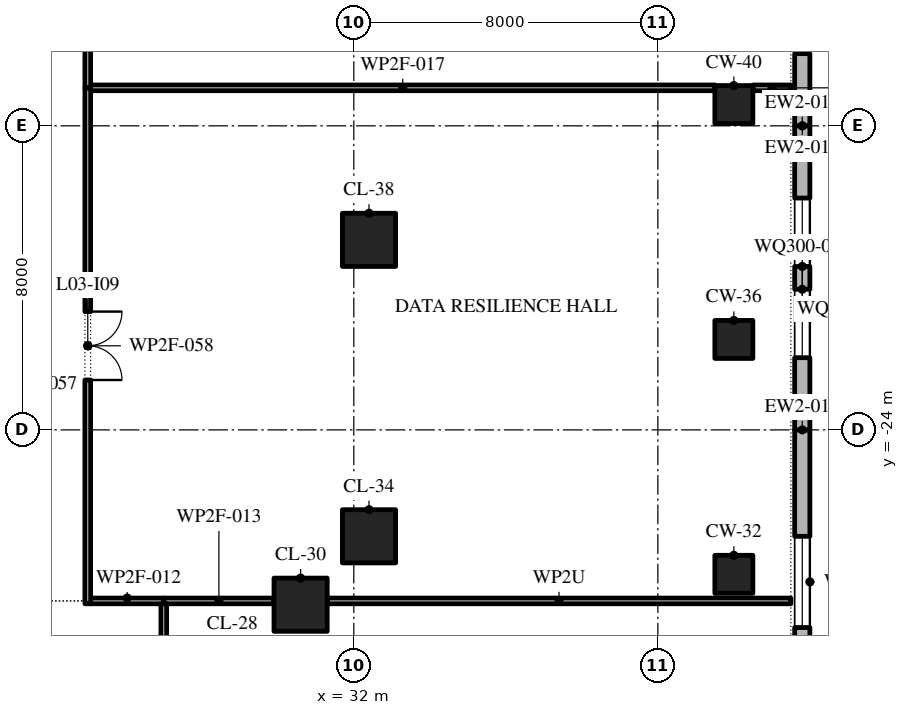
"""IFC4 building model, lengths in metres.
Left out: names, types, materials, properties, quantities, classifications, styles, units other than length and angle.
Written with IfcOpenShell. Run it as: python <this file> out.ifc"""

import sys

from ifc_helpers import new_model, si_unit, direction, frame, frame_2d, origin, origin_2d, place, context, subcontext, project, spatial, polyline, rectangle, outline, extrude, element, fill, save


model = new_model("IFC4")
c1 = context("Model", 3, precision=1e-05, world=origin(), true_north=direction((0.0, 1.0)))
c2 = subcontext(c1, "Body", "Model", "MODEL_VIEW")
j1 = project(units=[si_unit("LENGTHUNIT", "METRE"), si_unit("PLANEANGLEUNIT", "RADIAN")], contexts=[c1])
p1 = place(None, origin())
s1 = spatial("IfcSite", under=j1, at=p1, CompositionType="ELEMENT")
p2 = place(p1, origin())
s2 = spatial("IfcBuilding", under=s1, at=p2, CompositionType="ELEMENT")
p3 = place(p2, frame((0.0, 0.0, 19.2)))
s3 = spatial("IfcBuildingStorey", under=s2, at=p3, CompositionType="ELEMENT", Elevation=19.2)
p4 = place(p3, frame((30.6, -28.6, 0.0), z_axis=(0.0, 0.0, 1.0), x_axis=(1.0, 0.0, 0.0)))
e1 = element("IfcColumn", 1, at=p4, inside=s3, PredefinedType="COLUMN", context=c2, shape_type="SweptSolid", body=[
    extrude(rectangle(XDim=1.4, YDim=1.4, at=origin_2d()), origin(), (0.0, 0.0, 1.0), 4.8),
])
p5 = place(p3, frame((42.0, -27.8, 0.0), z_axis=(0.0, 0.0, 1.0), x_axis=(1.0, 0.0, 0.0)))
e2 = element("IfcColumn", 2, at=p5, inside=s3, PredefinedType="COLUMN", context=c2, shape_type="SweptSolid", body=[
    extrude(rectangle(XDim=1.0, YDim=1.0, at=origin_2d()), origin(), (0.0, 0.0, 1.0), 4.8),
])
p6 = place(p3, frame((32.4, -26.8, 0.0), z_axis=(0.0, 0.0, 1.0), x_axis=(1.0, 0.0, 0.0)))
e3 = element("IfcColumn", 3, at=p6, inside=s3, PredefinedType="COLUMN", context=c2, shape_type="SweptSolid", body=[
    extrude(rectangle(XDim=1.4, YDim=1.4, at=origin_2d()), origin(), (0.0, 0.0, 1.0), 4.8),
])
p7 = place(p3, frame((42.0, -21.62, 0.0), z_axis=(0.0, 0.0, 1.0), x_axis=(1.0, 0.0, 0.0)))
e4 = element("IfcColumn", 4, at=p7, inside=s3, PredefinedType="COLUMN", context=c2, shape_type="SweptSolid", body=[
    extrude(rectangle(XDim=1.0, YDim=1.0, at=origin_2d()), origin(), (0.0, 0.0, 1.0), 4.8),
])
p8 = place(p3, frame((32.4, -19.0, 0.0), z_axis=(0.0, 0.0, 1.0), x_axis=(1.0, 0.0, 0.0)))
e5 = element("IfcColumn", 5, at=p8, inside=s3, PredefinedType="COLUMN", context=c2, shape_type="SweptSolid", body=[
    extrude(rectangle(XDim=1.4, YDim=1.4, at=origin_2d()), origin(), (0.0, 0.0, 1.0), 4.8),
])
p9 = place(p3, frame((42.0, -15.44, 0.0), z_axis=(0.0, 0.0, 1.0), x_axis=(1.0, 0.0, 0.0)))
e6 = element("IfcColumn", 6, at=p9, inside=s3, PredefinedType="COLUMN", context=c2, shape_type="SweptSolid", body=[
    extrude(rectangle(XDim=1.0, YDim=1.0, at=origin_2d()), origin(), (0.0, 0.0, 1.0), 4.8),
])
p10 = place(p3, frame((43.8, -32.0, 0.0), z_axis=(0.0, 0.0, 1.0), x_axis=(0.0, 1.0, 0.0)))
e7 = element("IfcWall", 7, at=p10, inside=s3, PredefinedType="STANDARD", context=c2, shape_type="SweptSolid", body=[
    extrude(rectangle(XDim=8.0, YDim=0.4, at=frame_2d((4.0, 0.0))), origin(), (0.0, 0.0, 1.0), 4.5),
])
p11 = place(p10, frame((2.8, 0.0, 0.9)))
e8 = element("IfcOpeningElement", 8, at=p11, cuts=e7, PredefinedType="OPENING", context=c2, shape_type="SweptSolid", body=[
    extrude(outline(polyline([(0.0, 0.0), (2.4, 0.0), (2.4, 1.5), (2.378, 1.758), (2.313, 2.009), (2.207, 2.245), (2.063, 2.46), (1.885, 2.648), (1.677, 2.804), (1.447, 2.922), (1.2, 3.0), (0.953, 2.922), (0.722, 2.804), (0.515, 2.648), (0.337, 2.46), (0.193, 2.245), (0.087, 2.009), (0.022, 1.758), (0.0, 1.5), (0.0, 0.0)])), frame((0.0, 0.21, 0.0), z_axis=(0.0, -1.0, 0.0), x_axis=(1.0, 0.0, 0.0)), (0.0, 0.0, 1.0), 0.42),
])
p12 = place(p3, frame((43.8, -24.0, 0.0), z_axis=(0.0, 0.0, 1.0), x_axis=(0.0, 1.0, 0.0)))
e9 = element("IfcWall", 9, at=p12, inside=s3, PredefinedType="STANDARD", context=c2, shape_type="SweptSolid", body=[
    extrude(rectangle(XDim=8.0, YDim=0.4, at=frame_2d((4.0, 0.0))), origin(), (0.0, 0.0, 1.0), 4.5),
])
p13 = place(p12, frame((1.9, 0.0, 0.9)))
e10 = element("IfcOpeningElement", 10, at=p13, cuts=e9, PredefinedType="OPENING", context=c2, shape_type="SweptSolid", body=[
    extrude(outline(polyline([(0.0, 0.0), (1.8, 0.0), (1.8, 1.5), (1.785, 1.729), (1.738, 1.954), (1.662, 2.17), (1.558, 2.375), (1.427, 2.563), (1.271, 2.732), (1.095, 2.879), (0.9, 3.0), (0.705, 2.879), (0.529, 2.732), (0.373, 2.563), (0.242, 2.375), (0.138, 2.17), (0.062, 1.954), (0.015, 1.729), (0.0, 1.5), (0.0, 0.0)])), frame((0.0, 0.21, 0.0), z_axis=(0.0, -1.0, 0.0), x_axis=(1.0, 0.0, 0.0)), (0.0, 0.0, 1.0), 0.42),
])
p14 = place(p12, frame((4.3, 0.0, 0.9)))
e11 = element("IfcOpeningElement", 11, at=p14, cuts=e9, PredefinedType="OPENING", context=c2, shape_type="SweptSolid", body=[
    extrude(outline(polyline([(0.0, 0.0), (1.8, 0.0), (1.8, 1.5), (1.785, 1.729), (1.738, 1.954), (1.662, 2.17), (1.558, 2.375), (1.427, 2.563), (1.271, 2.732), (1.095, 2.879), (0.9, 3.0), (0.705, 2.879), (0.529, 2.732), (0.373, 2.563), (0.242, 2.375), (0.138, 2.17), (0.062, 1.954), (0.015, 1.729), (0.0, 1.5), (0.0, 0.0)])), frame((0.0, 0.21, 0.0), z_axis=(0.0, -1.0, 0.0), x_axis=(1.0, 0.0, 0.0)), (0.0, 0.0, 1.0), 0.42),
])
p15 = place(p3, frame((43.8, -16.0, 0.0), z_axis=(0.0, 0.0, 1.0), x_axis=(0.0, 1.0, 0.0)))
e12 = element("IfcWall", 12, at=p15, inside=s3, PredefinedType="STANDARD", context=c2, shape_type="SweptSolid", body=[
    extrude(rectangle(XDim=8.0, YDim=0.4, at=frame_2d((4.0, 0.0))), origin(), (0.0, 0.0, 1.0), 4.5),
])
p16 = place(p15, frame((1.9, 0.0, 0.9)))
e13 = element("IfcOpeningElement", 13, at=p16, cuts=e12, PredefinedType="OPENING", context=c2, shape_type="SweptSolid", body=[
    extrude(outline(polyline([(0.0, 0.0), (1.8, 0.0), (1.8, 1.5), (1.785, 1.729), (1.738, 1.954), (1.662, 2.17), (1.558, 2.375), (1.427, 2.563), (1.271, 2.732), (1.095, 2.879), (0.9, 3.0), (0.705, 2.879), (0.529, 2.732), (0.373, 2.563), (0.242, 2.375), (0.138, 2.17), (0.062, 1.954), (0.015, 1.729), (0.0, 1.5), (0.0, 0.0)])), frame((0.0, 0.21, 0.0), z_axis=(0.0, -1.0, 0.0), x_axis=(1.0, 0.0, 0.0)), (0.0, 0.0, 1.0), 0.42),
])
p17 = place(p15, frame((4.3, 0.0, 0.9)))
e14 = element("IfcOpeningElement", 14, at=p17, cuts=e12, PredefinedType="OPENING", context=c2, shape_type="SweptSolid", body=[
    extrude(outline(polyline([(0.0, 0.0), (1.8, 0.0), (1.8, 1.5), (1.785, 1.729), (1.738, 1.954), (1.662, 2.17), (1.558, 2.375), (1.427, 2.563), (1.271, 2.732), (1.095, 2.879), (0.9, 3.0), (0.705, 2.879), (0.529, 2.732), (0.373, 2.563), (0.242, 2.375), (0.138, 2.17), (0.062, 1.954), (0.015, 1.729), (0.0, 1.5), (0.0, 0.0)])), frame((0.0, 0.21, 0.0), z_axis=(0.0, -1.0, 0.0), x_axis=(1.0, 0.0, 0.0)), (0.0, 0.0, 1.0), 0.42),
])
p18 = place(p3, frame((25.075, -28.5, 0.0), z_axis=(0.0, 0.0, 1.0), x_axis=(1.0, 0.0, 0.0)))
e15 = element("IfcWall", 15, at=p18, inside=s3, PredefinedType="PARTITIONING", context=c2, shape_type="SweptSolid", body=[
    extrude(rectangle(XDim=1.925, YDim=0.15, at=frame_2d((0.962, 0.0))), origin(), (0.0, 0.0, 1.0), 4.5),
])
p19 = place(p3, frame((27.0, -28.5, 0.0), z_axis=(0.0, 0.0, 1.0), x_axis=(1.0, 0.0, 0.0)))
e16 = element("IfcWall", 16, at=p19, inside=s3, PredefinedType="PARTITIONING", context=c2, shape_type="SweptSolid", body=[
    extrude(rectangle(XDim=2.9, YDim=0.15, at=frame_2d((1.45, 0.0))), origin(), (0.0, 0.0, 1.0), 4.5),
])
p20 = place(p3, frame((31.3, -28.5, 0.0), z_axis=(0.0, 0.0, 1.0), x_axis=(1.0, 0.0, 0.0)))
e17 = element("IfcWall", 17, at=p20, inside=s3, PredefinedType="PARTITIONING", context=c2, shape_type="SweptSolid", body=[
    extrude(rectangle(XDim=12.2, YDim=0.15, at=frame_2d((6.1, 0.0))), origin(), (0.0, 0.0, 1.0), 3.964),
])
p21 = place(p3, frame((25.075, -15.0, 0.0), z_axis=(0.0, 0.0, 1.0), x_axis=(1.0, 0.0, 0.0)))
e18 = element("IfcWall", 18, at=p21, inside=s3, PredefinedType="PARTITIONING", context=c2, shape_type="SweptSolid", body=[
    extrude(rectangle(XDim=16.425, YDim=0.15, at=frame_2d((8.212, 0.0))), origin(), (0.0, 0.0, 1.0), 4.5),
])
p22 = place(p3, frame((42.5, -15.0, 0.0), z_axis=(0.0, 0.0, 1.0), x_axis=(1.0, 0.0, 0.0)))
e19 = element("IfcWall", 19, at=p22, inside=s3, PredefinedType="PARTITIONING", context=c2, shape_type="SweptSolid", body=[
    extrude(rectangle(XDim=1.0, YDim=0.15, at=frame_2d((0.5, 0.0))), origin(), (0.0, 0.0, 1.0), 4.5),
])
p23 = place(p3, frame((25.0, -28.575, 0.0), z_axis=(0.0, 0.0, 1.0), x_axis=(0.0, 1.0, 0.0)))
e20 = element("IfcWall", 20, at=p23, inside=s3, PredefinedType="PARTITIONING", context=c2, shape_type="SweptSolid", body=[
    extrude(rectangle(XDim=13.575, YDim=0.15, at=frame_2d((6.788, 0.0))), origin(), (0.0, 0.0, 1.0), 4.5),
])
p24 = place(p23, frame((5.887, 0.0, 0.0)))
e21 = element("IfcOpeningElement", 21, at=p24, cuts=e20, PredefinedType="OPENING", context=c2, shape_type="SweptSolid", body=[
    extrude(rectangle(XDim=1.8, YDim=2.1, at=frame_2d((0.9, 1.05))), frame((0.0, 0.085, 0.0), z_axis=(0.0, -1.0, 0.0), x_axis=(1.0, 0.0, 0.0)), (0.0, 0.0, 1.0), 0.17),
])
p25 = place(p3, frame((25.0, -15.0, 0.0), z_axis=(0.0, 0.0, 1.0), x_axis=(0.0, 1.0, 0.0)))
e22 = element("IfcWall", 22, at=p25, inside=s3, PredefinedType="PARTITIONING", context=c2, shape_type="SweptSolid", body=[
    extrude(rectangle(XDim=11.0, YDim=0.15, at=frame_2d((5.5, 0.0))), origin(), (0.0, 0.0, 1.0), 4.5),
])
p26 = place(p25, frame((4.6, 0.0, 0.0)))
e23 = element("IfcOpeningElement", 23, at=p26, cuts=e22, PredefinedType="OPENING", context=c2, shape_type="SweptSolid", body=[
    extrude(rectangle(XDim=1.8, YDim=2.1, at=frame_2d((0.9, 1.05))), frame((0.0, 0.085, 0.0), z_axis=(0.0, -1.0, 0.0), x_axis=(1.0, 0.0, 0.0)), (0.0, 0.0, 1.0), 0.17),
])
p27 = place(p3, frame((27.0, -32.0, 0.0), z_axis=(0.0, 0.0, 1.0), x_axis=(0.0, 1.0, 0.0)))
e24 = element("IfcWall", 24, at=p27, inside=s3, PredefinedType="PARTITIONING", context=c2, shape_type="SweptSolid", body=[
    extrude(rectangle(XDim=3.425, YDim=0.15, at=frame_2d((1.712, 0.0))), origin(), (0.0, 0.0, 1.0), 4.5),
])
p28 = place(p11, origin())
e25 = element("IfcWindow", 25, at=p28, inside=s3, PartitioningType="DOUBLE_PANEL_VERTICAL", PredefinedType="WINDOW", context=c2, shape_type="SweptSolid", body=[
    extrude(outline(polyline([(0.0, 0.0), (2.4, 0.0), (2.4, 1.5), (2.378, 1.758), (2.313, 2.009), (2.207, 2.245), (2.063, 2.46), (1.885, 2.648), (1.677, 2.804), (1.447, 2.922), (1.2, 3.0), (0.953, 2.922), (0.722, 2.804), (0.515, 2.648), (0.337, 2.46), (0.193, 2.245), (0.087, 2.009), (0.022, 1.758), (0.0, 1.5), (0.0, 0.0)])), frame((0.0, 0.03, 0.0), z_axis=(0.0, -1.0, 0.0), x_axis=(1.0, 0.0, 0.0)), (0.0, 0.0, 1.0), 0.06),
])
fill(e8, e25)
p29 = place(p13, origin())
e26 = element("IfcWindow", 26, at=p29, inside=s3, PartitioningType="DOUBLE_PANEL_VERTICAL", PredefinedType="WINDOW", context=c2, shape_type="SweptSolid", body=[
    extrude(outline(polyline([(0.0, 0.0), (1.8, 0.0), (1.8, 1.5), (1.785, 1.729), (1.738, 1.954), (1.662, 2.17), (1.558, 2.375), (1.427, 2.563), (1.271, 2.732), (1.095, 2.879), (0.9, 3.0), (0.705, 2.879), (0.529, 2.732), (0.373, 2.563), (0.242, 2.375), (0.138, 2.17), (0.062, 1.954), (0.015, 1.729), (0.0, 1.5), (0.0, 0.0)])), frame((0.0, 0.03, 0.0), z_axis=(0.0, -1.0, 0.0), x_axis=(1.0, 0.0, 0.0)), (0.0, 0.0, 1.0), 0.06),
])
fill(e10, e26)
p30 = place(p14, origin())
e27 = element("IfcWindow", 27, at=p30, inside=s3, PartitioningType="DOUBLE_PANEL_VERTICAL", PredefinedType="WINDOW", context=c2, shape_type="SweptSolid", body=[
    extrude(outline(polyline([(0.0, 0.0), (1.8, 0.0), (1.8, 1.5), (1.785, 1.729), (1.738, 1.954), (1.662, 2.17), (1.558, 2.375), (1.427, 2.563), (1.271, 2.732), (1.095, 2.879), (0.9, 3.0), (0.705, 2.879), (0.529, 2.732), (0.373, 2.563), (0.242, 2.375), (0.138, 2.17), (0.062, 1.954), (0.015, 1.729), (0.0, 1.5), (0.0, 0.0)])), frame((0.0, 0.03, 0.0), z_axis=(0.0, -1.0, 0.0), x_axis=(1.0, 0.0, 0.0)), (0.0, 0.0, 1.0), 0.06),
])
fill(e11, e27)
p31 = place(p16, origin())
e28 = element("IfcWindow", 28, at=p31, inside=s3, PartitioningType="DOUBLE_PANEL_VERTICAL", PredefinedType="WINDOW", context=c2, shape_type="SweptSolid", body=[
    extrude(outline(polyline([(0.0, 0.0), (1.8, 0.0), (1.8, 1.5), (1.785, 1.729), (1.738, 1.954), (1.662, 2.17), (1.558, 2.375), (1.427, 2.563), (1.271, 2.732), (1.095, 2.879), (0.9, 3.0), (0.705, 2.879), (0.529, 2.732), (0.373, 2.563), (0.242, 2.375), (0.138, 2.17), (0.062, 1.954), (0.015, 1.729), (0.0, 1.5), (0.0, 0.0)])), frame((0.0, 0.03, 0.0), z_axis=(0.0, -1.0, 0.0), x_axis=(1.0, 0.0, 0.0)), (0.0, 0.0, 1.0), 0.06),
])
fill(e13, e28)
p32 = place(p24, frame((1.8, 0.0, 0.0), z_axis=(0.0, 0.0, 1.0), x_axis=(-1.0, 0.0, 0.0)))
e29 = element("IfcDoor", 29, at=p32, inside=s3, OperationType="SINGLE_SWING_RIGHT", PredefinedType="DOOR", context=c2, shape_type="SweptSolid", body=[
    extrude(rectangle(XDim=1.8, YDim=2.1, at=frame_2d((0.9, 1.05))), frame((0.0, 0.025, 0.0), z_axis=(0.0, -1.0, 0.0), x_axis=(1.0, 0.0, 0.0)), (0.0, 0.0, 1.0), 0.05),
])
fill(e21, e29)
save(model, sys.argv[1])
